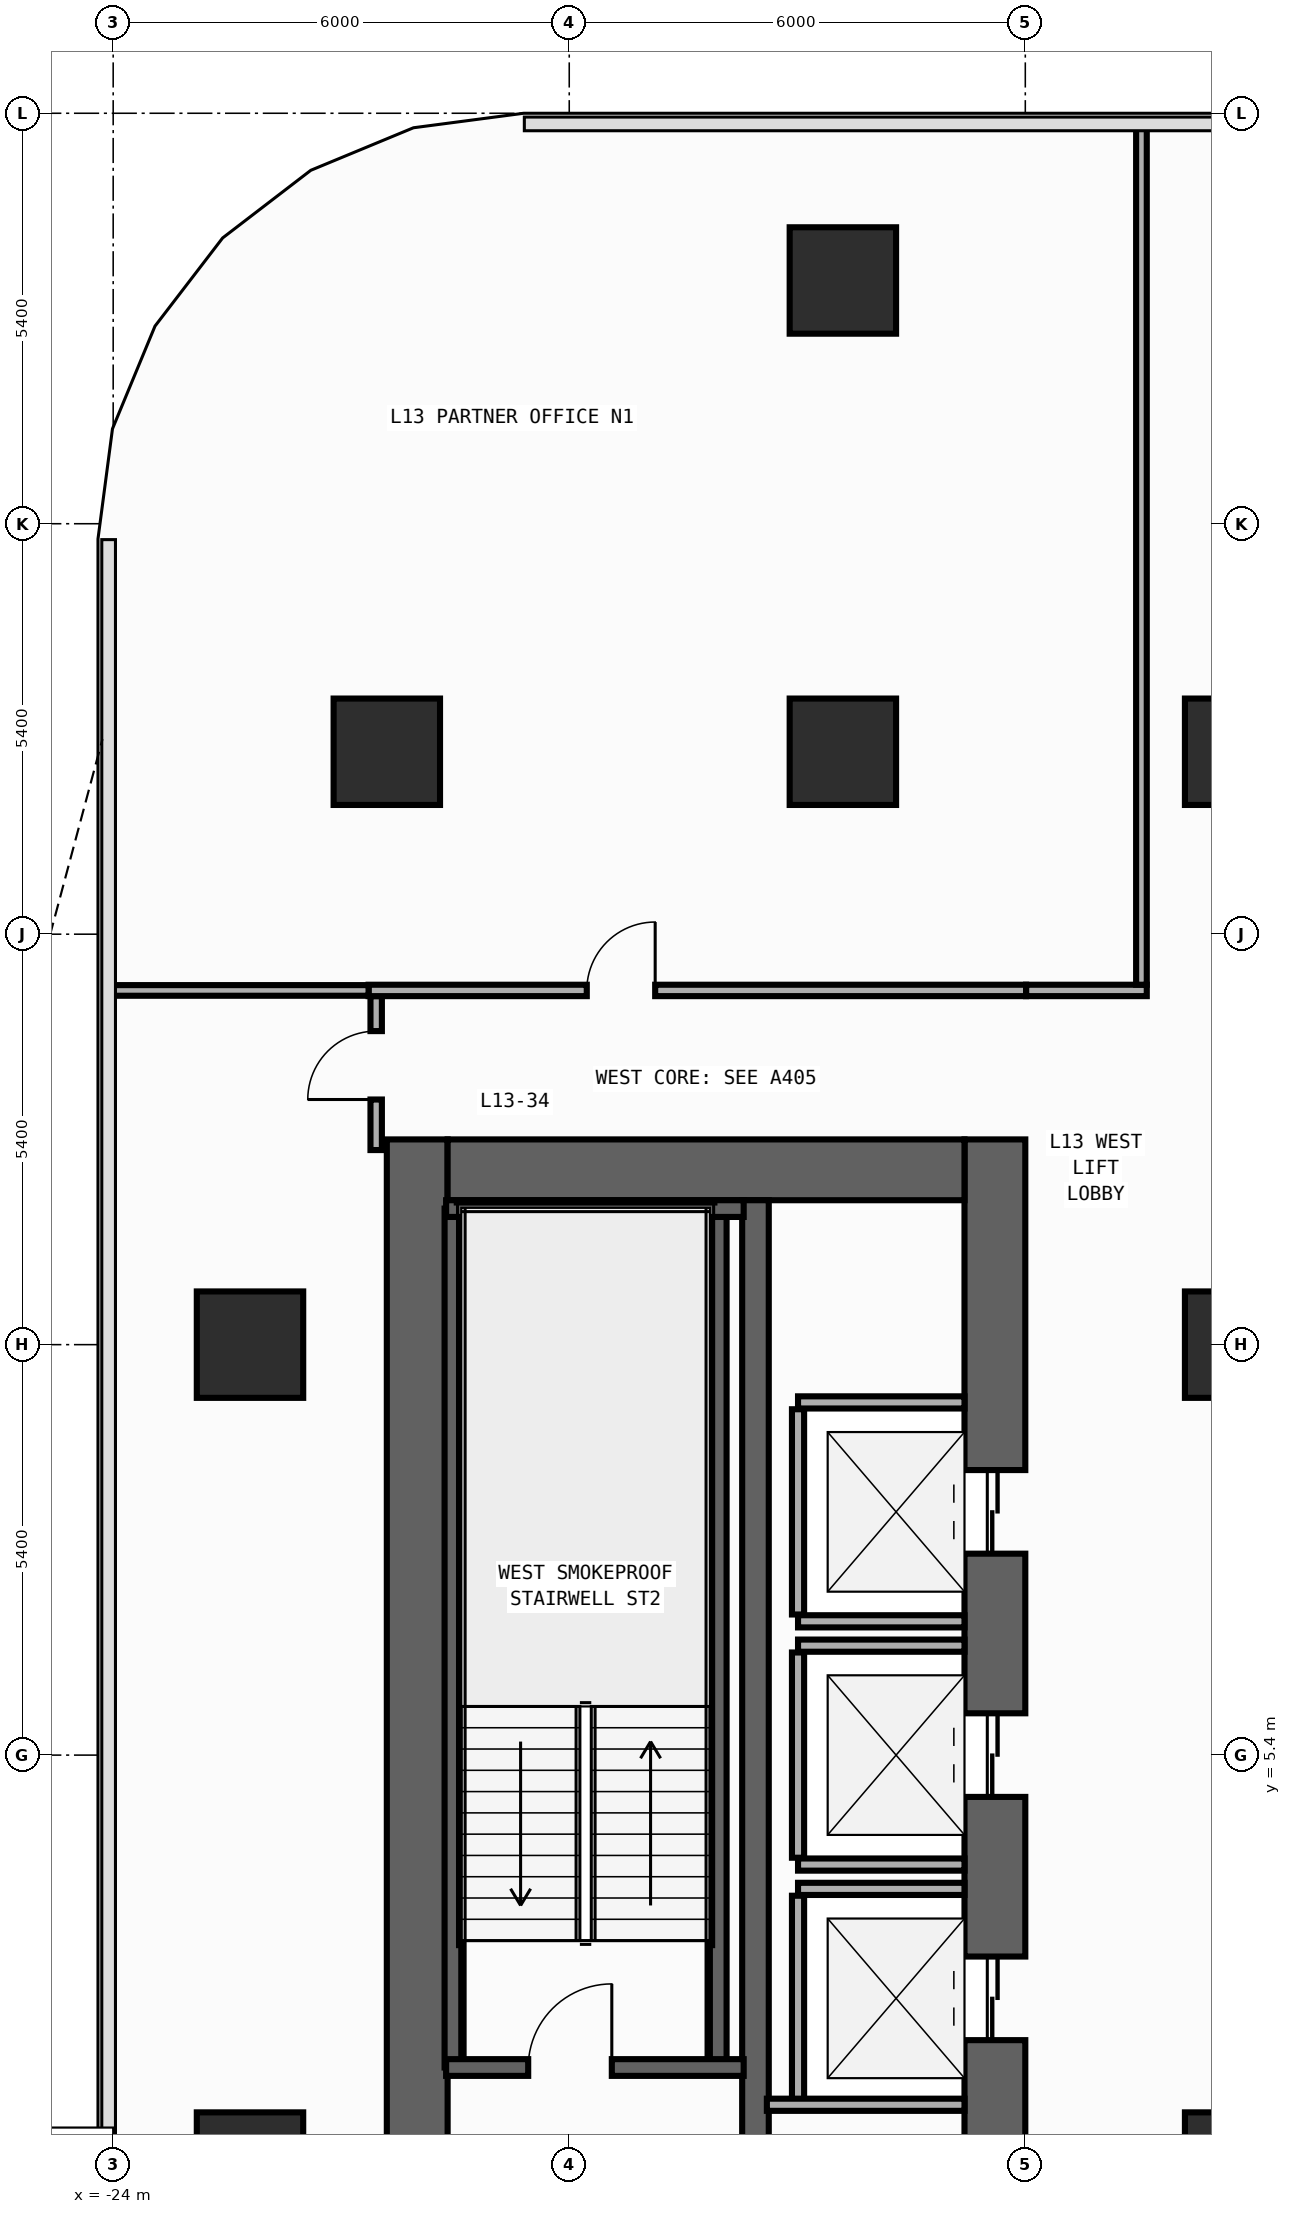
"""IFC4 building model, lengths in metres.
Left out: names, types, materials, properties, quantities, classifications, styles, units other than length and angle.
Written with IfcOpenShell. Run it as: python <this file> out.ifc"""

import sys

from ifc_helpers import new_model, si_unit, direction, frame, frame_2d, origin, origin_2d, place, context, subcontext, project, spatial, rectangle, extrude, element, fill, save


model = new_model("IFC4")
c1 = context("Model", 3, precision=1e-05, world=origin(), true_north=direction((0.0, 1.0)))
c2 = subcontext(c1, "Body", "Model", "MODEL_VIEW")
j1 = project(units=[si_unit("LENGTHUNIT", "METRE"), si_unit("PLANEANGLEUNIT", "RADIAN")], contexts=[c1])
p1 = place(None, origin())
s1 = spatial("IfcSite", under=j1, at=p1, CompositionType="ELEMENT")
p2 = place(p1, origin())
s2 = spatial("IfcBuilding", under=s1, at=p2, CompositionType="ELEMENT")
p3 = place(p2, frame((0.0, 0.0, 55.4)))
s3 = spatial("IfcBuildingStorey", under=s2, at=p3, CompositionType="ELEMENT", Elevation=55.4)
p4 = place(p3, frame((-20.0, -13.5, 0.0), z_axis=(0.0, 0.0, 1.0), x_axis=(0.0, 1.0, 0.0)))
e1 = element("IfcWall", 1, at=p4, inside=s3, PredefinedType="SHEAR", context=c2, shape_type="SweptSolid", body=[
    extrude(rectangle(XDim=27.0, YDim=0.8, at=frame_2d((13.5, 0.0))), origin(), (0.0, 0.0, 1.0), 3.94),
])
p5 = place(p3, frame((-12.4, -13.5, 0.0), z_axis=(0.0, 0.0, 1.0), x_axis=(0.0, 1.0, 0.0)))
e2 = element("IfcWall", 2, at=p5, inside=s3, PredefinedType="SHEAR", context=c2, shape_type="SweptSolid", body=[
    extrude(rectangle(XDim=27.0, YDim=0.8, at=frame_2d((13.5, 0.0))), origin(), (0.0, 0.0, 1.0), 3.94),
])
p6 = place(p5, frame((21.55, 0.0, 0.0)))
e3 = element("IfcOpeningElement", 3, at=p6, cuts=e2, PredefinedType="OPENING", context=c2, shape_type="SweptSolid", body=[
    extrude(rectangle(XDim=1.1, YDim=2.2, at=frame_2d((0.55, 1.1))), frame((0.0, 0.41, 0.0), z_axis=(0.0, -1.0, 0.0), x_axis=(1.0, 0.0, 0.0)), (0.0, 0.0, 1.0), 0.82),
])
p7 = place(p5, frame((18.35, 0.0, 0.0)))
e4 = element("IfcOpeningElement", 4, at=p7, cuts=e2, PredefinedType="OPENING", context=c2, shape_type="SweptSolid", body=[
    extrude(rectangle(XDim=1.1, YDim=2.2, at=frame_2d((0.55, 1.1))), frame((0.0, 0.41, 0.0), z_axis=(0.0, -1.0, 0.0), x_axis=(1.0, 0.0, 0.0)), (0.0, 0.0, 1.0), 0.82),
])
p8 = place(p5, frame((15.15, 0.0, 0.0)))
e5 = element("IfcOpeningElement", 5, at=p8, cuts=e2, PredefinedType="OPENING", context=c2, shape_type="SweptSolid", body=[
    extrude(rectangle(XDim=1.1, YDim=2.2, at=frame_2d((0.55, 1.1))), frame((0.0, 0.41, 0.0), z_axis=(0.0, -1.0, 0.0), x_axis=(1.0, 0.0, 0.0)), (0.0, 0.0, 1.0), 0.82),
])
p9 = place(p5, frame((10.35, 0.0, 0.0)))
e6 = element("IfcOpeningElement", 6, at=p9, cuts=e2, PredefinedType="OPENING", context=c2, shape_type="SweptSolid", body=[
    extrude(rectangle(XDim=1.1, YDim=2.2, at=frame_2d((0.55, 1.1))), frame((0.0, 0.41, 0.0), z_axis=(0.0, -1.0, 0.0), x_axis=(1.0, 0.0, 0.0)), (0.0, 0.0, 1.0), 0.82),
])
p10 = place(p5, frame((7.15, 0.0, 0.0)))
e7 = element("IfcOpeningElement", 7, at=p10, cuts=e2, PredefinedType="OPENING", context=c2, shape_type="SweptSolid", body=[
    extrude(rectangle(XDim=1.1, YDim=2.2, at=frame_2d((0.55, 1.1))), frame((0.0, 0.41, 0.0), z_axis=(0.0, -1.0, 0.0), x_axis=(1.0, 0.0, 0.0)), (0.0, 0.0, 1.0), 0.82),
])
p11 = place(p5, frame((3.95, 0.0, 0.0)))
e8 = element("IfcOpeningElement", 8, at=p11, cuts=e2, PredefinedType="OPENING", context=c2, shape_type="SweptSolid", body=[
    extrude(rectangle(XDim=1.1, YDim=2.2, at=frame_2d((0.55, 1.1))), frame((0.0, 0.41, 0.0), z_axis=(0.0, -1.0, 0.0), x_axis=(1.0, 0.0, 0.0)), (0.0, 0.0, 1.0), 0.82),
])
p12 = place(p5, frame((12.725, 0.0, 0.0)))
e9 = element("IfcOpeningElement", 9, at=p12, cuts=e2, PredefinedType="OPENING", context=c2, shape_type="SweptSolid", body=[
    extrude(rectangle(XDim=1.15, YDim=2.2, at=frame_2d((0.575, 1.1))), frame((0.0, 0.41, 0.0), z_axis=(0.0, -1.0, 0.0), x_axis=(1.0, 0.0, 0.0)), (0.0, 0.0, 1.0), 0.82),
])
p13 = place(p5, frame((1.625, 0.0, 0.0)))
e10 = element("IfcOpeningElement", 10, at=p13, cuts=e2, PredefinedType="OPENING", context=c2, shape_type="SweptSolid", body=[
    extrude(rectangle(XDim=0.85, YDim=2.1, at=frame_2d((0.425, 1.05))), frame((0.0, 0.41, 0.0), z_axis=(0.0, -1.0, 0.0), x_axis=(1.0, 0.0, 0.0)), (0.0, 0.0, 1.0), 0.82),
])
p14 = place(p3, frame((-19.6, 13.1, 0.0), z_axis=(0.0, 0.0, 1.0), x_axis=(1.0, 0.0, 0.0)))
e11 = element("IfcWall", 11, at=p14, inside=s3, PredefinedType="SHEAR", context=c2, shape_type="SweptSolid", body=[
    extrude(rectangle(XDim=6.8, YDim=0.8, at=frame_2d((3.4, 0.0))), origin(), (0.0, 0.0, 1.0), 3.94),
])
p15 = place(p3, frame((-15.55, -12.7, 0.0), z_axis=(0.0, 0.0, 1.0), x_axis=(0.0, 1.0, 0.0)))
e12 = element("IfcWall", 12, at=p15, inside=s3, PredefinedType="SHEAR", context=c2, shape_type="SweptSolid", body=[
    extrude(rectangle(XDim=25.4, YDim=0.35, at=frame_2d((12.7, 0.0))), origin(), (0.0, 0.0, 1.0), 3.94),
])
p16 = place(p15, frame((11.925, 0.0, 0.0)))
e13 = element("IfcOpeningElement", 13, at=p16, cuts=e12, PredefinedType="OPENING", context=c2, shape_type="SweptSolid", body=[
    extrude(rectangle(XDim=1.15, YDim=2.2, at=frame_2d((0.575, 1.1))), frame((0.0, 0.185, 0.0), z_axis=(0.0, -1.0, 0.0), x_axis=(1.0, 0.0, 0.0)), (0.0, 0.0, 1.0), 0.37),
])
p17 = place(p15, frame((0.825, 0.0, 0.0)))
e14 = element("IfcOpeningElement", 14, at=p17, cuts=e12, PredefinedType="OPENING", context=c2, shape_type="SweptSolid", body=[
    extrude(rectangle(XDim=0.85, YDim=2.1, at=frame_2d((0.425, 1.05))), frame((0.0, 0.185, 0.0), z_axis=(0.0, -1.0, 0.0), x_axis=(1.0, 0.0, 0.0)), (0.0, 0.0, 1.0), 0.37),
])
for number, where, z_axis, x_axis in (
    (15, (-16.04, 1.29, 0.0), (0.0, 0.0, 1.0), (0.0, 1.0, 0.0)),
    (16, (-19.53, 1.29, 0.0), (0.0, 0.0, 1.0), (0.0, 1.0, 0.0)),
):
    element("IfcWall", number, at=place(p3, frame(where, z_axis=z_axis, x_axis=x_axis)), inside=s3, PredefinedType="SHEAR", context=c2, shape_type="SweptSolid", body=[
        extrude(rectangle(XDim=11.3, YDim=0.22, at=frame_2d((5.65, 0.0))), origin(), (0.0, 0.0, 1.0), 3.94),
    ])
p18 = place(p3, frame((-19.62, 12.59, 0.0), z_axis=(0.0, 0.0, 1.0), x_axis=(1.0, 0.0, 0.0)))
e17 = element("IfcWall", 17, at=p18, inside=s3, PredefinedType="SHEAR", context=c2, shape_type="SweptSolid", body=[
    extrude(rectangle(XDim=3.915, YDim=0.22, at=frame_2d((1.958, 0.0))), origin(), (0.0, 0.0, 1.0), 3.94),
])
p19 = place(p3, frame((-19.62, 1.29, 0.0), z_axis=(0.0, 0.0, 1.0), x_axis=(1.0, 0.0, 0.0)))
e18 = element("IfcWall", 18, at=p19, inside=s3, PredefinedType="SHEAR", context=c2, shape_type="SweptSolid", body=[
    extrude(rectangle(XDim=3.915, YDim=0.22, at=frame_2d((1.958, 0.0))), origin(), (0.0, 0.0, 1.0), 3.94),
])
p20 = place(p19, frame((1.08, 0.0, 0.0)))
e19 = element("IfcOpeningElement", 19, at=p20, cuts=e18, PredefinedType="OPENING", context=c2, shape_type="SweptSolid", body=[
    extrude(rectangle(XDim=1.1, YDim=2.2, at=frame_2d((0.55, 1.1))), frame((0.0, 0.12, 0.0), z_axis=(0.0, -1.0, 0.0), x_axis=(1.0, 0.0, 0.0)), (0.0, 0.0, 1.0), 0.24),
])
for number, where, z_axis, x_axis in (
    (20, (-9.2, 0.0, 0.0), (0.0, 0.0, 1.0), (1.0, 0.0, 0.0)),
    (21, (-9.2, 10.8, 0.0), (0.0, 0.0, 1.0), (1.0, 0.0, 0.0)),
    (22, (-9.2, 18.6, 0.0), (0.0, 0.0, 1.0), (1.0, 0.0, 0.0)),
    (23, (-20.4, 18.6, 0.0), (0.0, 0.0, 1.0), (1.0, 0.0, 0.0)),
    (24, (-14.4, 18.6, 0.0), (0.0, 0.0, 1.0), (1.0, 0.0, 0.0)),
    (25, (-22.2, 0.0, 0.0), (0.0, 0.0, 1.0), (1.0, 0.0, 0.0)),
    (26, (-22.2, 10.8, 0.0), (0.0, 0.0, 1.0), (1.0, 0.0, 0.0)),
    (27, (-14.4, 24.8, 0.0), (0.0, 0.0, 1.0), (1.0, 0.0, 0.0)),
):
    element("IfcColumn", number, at=place(p3, frame(where, z_axis=z_axis, x_axis=x_axis)), inside=s3, PredefinedType="COLUMN", context=c2, shape_type="SweptSolid", body=[
        extrude(rectangle(XDim=1.4, YDim=1.4, at=origin_2d()), origin(), (0.0, 0.0, 1.0), 4.2),
    ])
for number, where, z_axis, x_axis in (
    (28, (-14.99, 7.16, 0.0), (0.0, 0.0, 1.0), (1.0, 0.0, 0.0)),
    (29, (-14.99, 10.04, 0.0), (0.0, 0.0, 1.0), (1.0, 0.0, 0.0)),
):
    element("IfcWall", number, at=place(p3, frame(where, z_axis=z_axis, x_axis=x_axis)), inside=s3, PredefinedType="STANDARD", context=c2, shape_type="SweptSolid", body=[
        extrude(rectangle(XDim=2.19, YDim=0.16, at=frame_2d((1.095, 0.0))), origin(), (0.0, 0.0, 1.0), 3.94),
    ])
p21 = place(p3, frame((-14.99, 7.25, 0.0), z_axis=(0.0, 0.0, 1.0), x_axis=(0.0, 1.0, 0.0)))
e30 = element("IfcWall", 30, at=p21, inside=s3, PredefinedType="STANDARD", context=c2, shape_type="SweptSolid", body=[
    extrude(rectangle(XDim=2.7, YDim=0.16, at=frame_2d((1.35, 0.0))), origin(), (0.0, 0.0, 1.0), 3.94),
])
for number, where, z_axis, x_axis in (
    (31, (-14.99, 3.96, 0.0), (0.0, 0.0, 1.0), (1.0, 0.0, 0.0)),
    (32, (-14.99, 6.84, 0.0), (0.0, 0.0, 1.0), (1.0, 0.0, 0.0)),
):
    element("IfcWall", number, at=place(p3, frame(where, z_axis=z_axis, x_axis=x_axis)), inside=s3, PredefinedType="STANDARD", context=c2, shape_type="SweptSolid", body=[
        extrude(rectangle(XDim=2.19, YDim=0.16, at=frame_2d((1.095, 0.0))), origin(), (0.0, 0.0, 1.0), 3.94),
    ])
p22 = place(p3, frame((-14.99, 4.05, 0.0), z_axis=(0.0, 0.0, 1.0), x_axis=(0.0, 1.0, 0.0)))
e33 = element("IfcWall", 33, at=p22, inside=s3, PredefinedType="STANDARD", context=c2, shape_type="SweptSolid", body=[
    extrude(rectangle(XDim=2.7, YDim=0.16, at=frame_2d((1.35, 0.0))), origin(), (0.0, 0.0, 1.0), 3.94),
])
p23 = place(p3, frame((-14.99, 3.64, 0.0), z_axis=(0.0, 0.0, 1.0), x_axis=(1.0, 0.0, 0.0)))
e34 = element("IfcWall", 34, at=p23, inside=s3, PredefinedType="STANDARD", context=c2, shape_type="SweptSolid", body=[
    extrude(rectangle(XDim=2.19, YDim=0.16, at=frame_2d((1.095, 0.0))), origin(), (0.0, 0.0, 1.0), 3.94),
])
p24 = place(p3, frame((-14.99, 0.85, 0.0), z_axis=(0.0, 0.0, 1.0), x_axis=(0.0, 1.0, 0.0)))
e35 = element("IfcWall", 35, at=p24, inside=s3, PredefinedType="STANDARD", context=c2, shape_type="SweptSolid", body=[
    extrude(rectangle(XDim=2.7, YDim=0.16, at=frame_2d((1.35, 0.0))), origin(), (0.0, 0.0, 1.0), 3.94),
])
p25 = place(p3, frame((-15.4, 0.8, 0.0), z_axis=(0.0, 0.0, 1.0), x_axis=(1.0, 0.0, 0.0)))
e36 = element("IfcWall", 36, at=p25, inside=s3, PredefinedType="STANDARD", context=c2, shape_type="SweptSolid", body=[
    extrude(rectangle(XDim=2.6, YDim=0.16, at=frame_2d((1.3, 0.0))), origin(), (0.0, 0.0, 1.0), 3.94),
])
p26 = place(p3, frame((-11.99, 15.46, 0.0), z_axis=(0.0, 0.0, 1.0), x_axis=(1.0, 0.0, 0.0)))
e37 = element("IfcWall", 37, at=p26, inside=s3, PredefinedType="PARTITIONING", context=c2, shape_type="SweptSolid", body=[
    extrude(rectangle(XDim=1.588, YDim=0.15, at=frame_2d((0.794, 0.0))), origin(), (0.0, 0.0, 1.0), 3.94),
])
p27 = place(p3, frame((-20.54, 13.36, 0.0), z_axis=(0.0, 0.0, 1.0), x_axis=(0.0, 1.0, 0.0)))
e38 = element("IfcWall", 38, at=p27, inside=s3, PredefinedType="PARTITIONING", context=c2, shape_type="SweptSolid", body=[
    extrude(rectangle(XDim=2.025, YDim=0.15, at=frame_2d((1.012, 0.0))), origin(), (0.0, 0.0, 1.0), 3.94),
])
p28 = place(p27, frame((0.665, 0.0, 0.0)))
e39 = element("IfcOpeningElement", 39, at=p28, cuts=e38, PredefinedType="OPENING", context=c2, shape_type="SweptSolid", body=[
    extrude(rectangle(XDim=0.9, YDim=2.15, at=frame_2d((0.45, 1.075))), frame((0.0, 0.085, 0.0), z_axis=(0.0, -1.0, 0.0), x_axis=(1.0, 0.0, 0.0)), (0.0, 0.0, 1.0), 0.17),
])
p29 = place(p3, frame((-20.64, 15.46, 0.0), z_axis=(0.0, 0.0, 1.0), x_axis=(1.0, 0.0, 0.0)))
e40 = element("IfcWall", 40, at=p29, inside=s3, PredefinedType="PARTITIONING", context=c2, shape_type="SweptSolid", body=[
    extrude(rectangle(XDim=8.65, YDim=0.15, at=frame_2d((4.325, 0.0))), origin(), (0.0, 0.0, 1.0), 3.94),
])
p30 = place(p29, frame((2.871, 0.0, 0.0)))
e41 = element("IfcOpeningElement", 41, at=p30, cuts=e40, PredefinedType="OPENING", context=c2, shape_type="SweptSolid", body=[
    extrude(rectangle(XDim=0.9, YDim=2.15, at=frame_2d((0.45, 1.075))), frame((0.0, 0.085, 0.0), z_axis=(0.0, -1.0, 0.0), x_axis=(1.0, 0.0, 0.0)), (0.0, 0.0, 1.0), 0.17),
])
p31 = place(p3, frame((-24.055, 15.46, 0.0), z_axis=(0.0, 0.0, 1.0), x_axis=(1.0, 0.0, 0.0)))
e42 = element("IfcWall", 42, at=p31, inside=s3, PredefinedType="PARTITIONING", context=c2, shape_type="SweptSolid", body=[
    extrude(rectangle(XDim=3.415, YDim=0.14, at=frame_2d((1.708, 0.0))), origin(), (0.0, 0.0, 1.0), 3.94),
])
p32 = place(p3, frame((-10.472, 15.535, 0.0), z_axis=(0.0, 0.0, 1.0), x_axis=(0.0, 1.0, 0.0)))
e43 = element("IfcWall", 43, at=p32, inside=s3, PredefinedType="PARTITIONING", context=c2, shape_type="SweptSolid", body=[
    extrude(rectangle(XDim=11.32, YDim=0.14, at=frame_2d((5.66, 0.0))), origin(), (0.0, 0.0, 1.0), 3.94),
])
p33 = place(p20, origin())
e44 = element("IfcDoor", 44, at=p33, inside=s3, OperationType="SINGLE_SWING_RIGHT", PredefinedType="DOOR", context=c2, shape_type="SweptSolid", body=[
    extrude(rectangle(XDim=1.1, YDim=2.2, at=frame_2d((0.55, 1.1))), frame((0.0, 0.025, 0.0), z_axis=(0.0, -1.0, 0.0), x_axis=(1.0, 0.0, 0.0)), (0.0, 0.0, 1.0), 0.05),
])
fill(e19, e44)
p34 = place(p6, origin())
e45 = element("IfcDoor", 45, at=p34, inside=s3, OperationType="DOUBLE_DOOR_SLIDING", PredefinedType="DOOR", context=c2, shape_type="SweptSolid", body=[
    extrude(rectangle(XDim=1.1, YDim=2.2, at=frame_2d((0.55, 1.1))), frame((0.0, 0.025, 0.0), z_axis=(0.0, -1.0, 0.0), x_axis=(1.0, 0.0, 0.0)), (0.0, 0.0, 1.0), 0.05),
])
fill(e3, e45)
p35 = place(p7, origin())
e46 = element("IfcDoor", 46, at=p35, inside=s3, OperationType="DOUBLE_DOOR_SLIDING", PredefinedType="DOOR", context=c2, shape_type="SweptSolid", body=[
    extrude(rectangle(XDim=1.1, YDim=2.2, at=frame_2d((0.55, 1.1))), frame((0.0, 0.025, 0.0), z_axis=(0.0, -1.0, 0.0), x_axis=(1.0, 0.0, 0.0)), (0.0, 0.0, 1.0), 0.05),
])
fill(e4, e46)
p36 = place(p8, origin())
e47 = element("IfcDoor", 47, at=p36, inside=s3, OperationType="DOUBLE_DOOR_SLIDING", PredefinedType="DOOR", context=c2, shape_type="SweptSolid", body=[
    extrude(rectangle(XDim=1.1, YDim=2.2, at=frame_2d((0.55, 1.1))), frame((0.0, 0.025, 0.0), z_axis=(0.0, -1.0, 0.0), x_axis=(1.0, 0.0, 0.0)), (0.0, 0.0, 1.0), 0.05),
])
fill(e5, e47)
p37 = place(p28, origin())
e48 = element("IfcDoor", 48, at=p37, inside=s3, OperationType="SINGLE_SWING_LEFT", PredefinedType="DOOR", context=c2, shape_type="SweptSolid", body=[
    extrude(rectangle(XDim=0.9, YDim=2.15, at=frame_2d((0.45, 1.075))), frame((0.0, 0.025, 0.0), z_axis=(0.0, -1.0, 0.0), x_axis=(1.0, 0.0, 0.0)), (0.0, 0.0, 1.0), 0.05),
])
fill(e39, e48)
p38 = place(p30, origin())
e49 = element("IfcDoor", 49, at=p38, inside=s3, OperationType="SINGLE_SWING_RIGHT", PredefinedType="DOOR", context=c2, shape_type="SweptSolid", body=[
    extrude(rectangle(XDim=0.9, YDim=2.15, at=frame_2d((0.45, 1.075))), frame((0.0, 0.025, 0.0), z_axis=(0.0, -1.0, 0.0), x_axis=(1.0, 0.0, 0.0)), (0.0, 0.0, 1.0), 0.05),
])
fill(e41, e49)
save(model, sys.argv[1])
